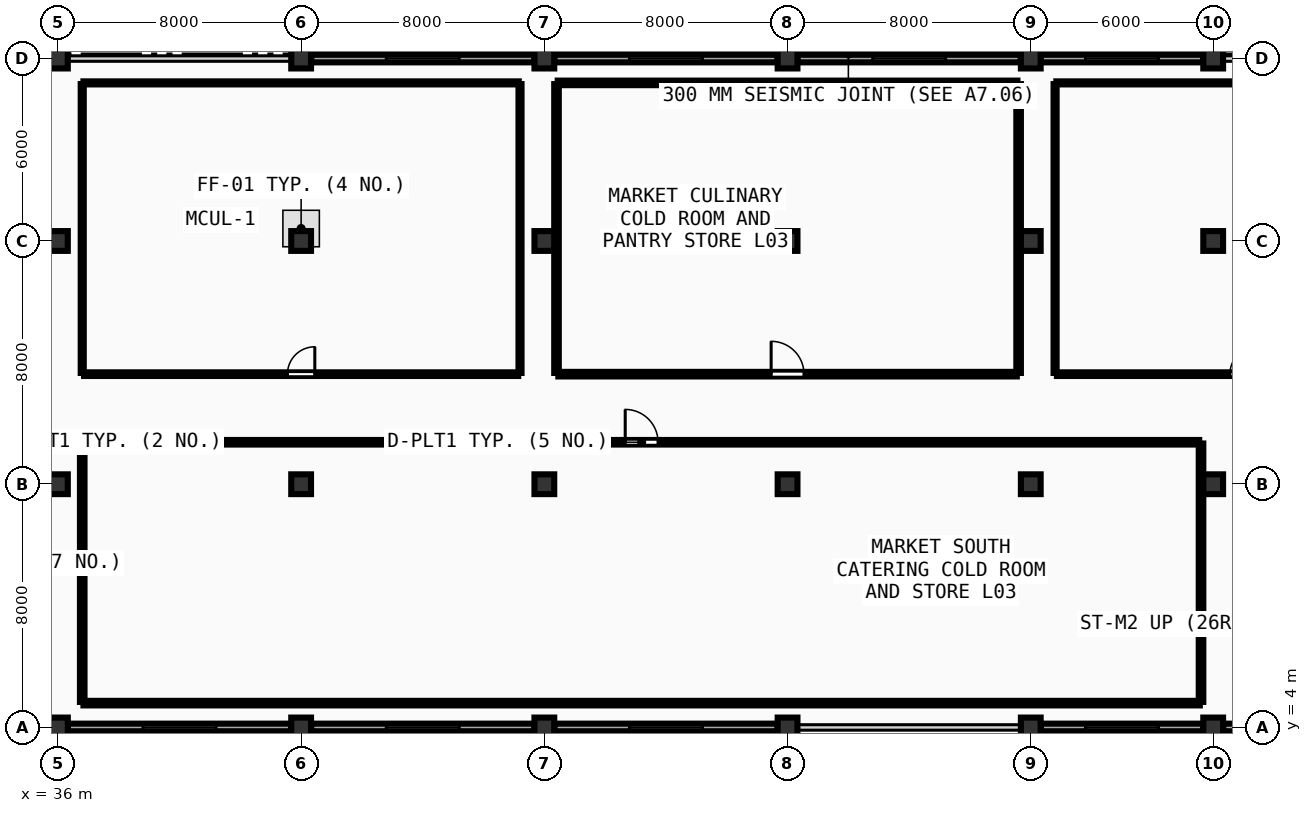
"""IFC4 building model, lengths in metres.
Left out: names, types, materials, properties, quantities, classifications, styles, units other than length and angle.
Written with IfcOpenShell. Run it as: python <this file> out.ifc"""

import sys

from ifc_helpers import new_model, si_unit, direction, frame, frame_2d, origin, origin_2d, place, context, subcontext, project, spatial, rectangle, extrude, element, fill, save


model = new_model("IFC4")
c1 = context("Model", 3, precision=1e-05, world=origin(), true_north=direction((0.0, 1.0)))
c2 = subcontext(c1, "Body", "Model", "MODEL_VIEW")
j1 = project(units=[si_unit("LENGTHUNIT", "METRE"), si_unit("PLANEANGLEUNIT", "RADIAN")], contexts=[c1])
p1 = place(None, origin())
s1 = spatial("IfcSite", under=j1, at=p1, CompositionType="ELEMENT")
p2 = place(p1, origin())
s2 = spatial("IfcBuilding", under=s1, at=p2, CompositionType="ELEMENT")
p3 = place(p2, frame((0.0, 0.0, 13.5)))
s3 = spatial("IfcBuildingStorey", under=s2, at=p3, CompositionType="ELEMENT", Elevation=13.5)
for number, where, z_axis, x_axis in (
    (1, (36.0, 4.0, 0.0), (0.0, 0.0, 1.0), (1.0, 0.0, 0.0)),
    (2, (36.0, 12.0, 0.0), (0.0, 0.0, 1.0), (1.0, 0.0, 0.0)),
    (3, (36.0, 20.0, 0.0), (0.0, 0.0, 1.0), (1.0, 0.0, 0.0)),
    (4, (36.0, 26.0, 0.0), (0.0, 0.0, 1.0), (1.0, 0.0, 0.0)),
    (5, (44.0, 4.0, 0.0), (0.0, 0.0, 1.0), (1.0, 0.0, 0.0)),
    (6, (44.0, 12.0, 0.0), (0.0, 0.0, 1.0), (1.0, 0.0, 0.0)),
    (7, (44.0, 20.0, 0.0), (0.0, 0.0, 1.0), (1.0, 0.0, 0.0)),
    (8, (44.0, 26.0, 0.0), (0.0, 0.0, 1.0), (1.0, 0.0, 0.0)),
    (9, (52.0, 4.0, 0.0), (0.0, 0.0, 1.0), (1.0, 0.0, 0.0)),
    (10, (52.0, 12.0, 0.0), (0.0, 0.0, 1.0), (1.0, 0.0, 0.0)),
    (11, (52.0, 20.0, 0.0), (0.0, 0.0, 1.0), (1.0, 0.0, 0.0)),
    (12, (52.0, 26.0, 0.0), (0.0, 0.0, 1.0), (1.0, 0.0, 0.0)),
    (13, (60.0, 4.0, 0.0), (0.0, 0.0, 1.0), (1.0, 0.0, 0.0)),
    (14, (60.0, 12.0, 0.0), (0.0, 0.0, 1.0), (1.0, 0.0, 0.0)),
    (15, (60.0, 20.0, 0.0), (0.0, 0.0, 1.0), (1.0, 0.0, 0.0)),
    (16, (60.0, 26.0, 0.0), (0.0, 0.0, 1.0), (1.0, 0.0, 0.0)),
    (17, (68.0, 4.0, 0.0), (0.0, 0.0, 1.0), (1.0, 0.0, 0.0)),
    (18, (68.0, 12.0, 0.0), (0.0, 0.0, 1.0), (1.0, 0.0, 0.0)),
    (19, (68.0, 20.0, 0.0), (0.0, 0.0, 1.0), (1.0, 0.0, 0.0)),
    (20, (68.0, 26.0, 0.0), (0.0, 0.0, 1.0), (1.0, 0.0, 0.0)),
    (21, (74.0, 4.0, 0.0), (0.0, 0.0, 1.0), (1.0, 0.0, 0.0)),
    (22, (74.0, 12.0, 0.0), (0.0, 0.0, 1.0), (1.0, 0.0, 0.0)),
    (23, (74.0, 20.0, 0.0), (0.0, 0.0, 1.0), (1.0, 0.0, 0.0)),
    (24, (74.0, 26.0, 0.0), (0.0, 0.0, 1.0), (1.0, 0.0, 0.0)),
):
    element("IfcColumn", number, at=place(p3, frame(where, z_axis=z_axis, x_axis=x_axis)), inside=s3, PredefinedType="COLUMN", context=c2, shape_type="SweptSolid", body=[
        extrude(rectangle(XDim=0.65, YDim=0.65, at=origin_2d()), origin(), (0.0, 0.0, 1.0), 4.5),
    ])
p4 = place(p3, frame((36.33, 4.0, 0.0), z_axis=(0.0, 0.0, 1.0), x_axis=(1.0, 0.0, 0.0)))
e25 = element("IfcWall", 25, at=p4, inside=s3, PredefinedType="SOLIDWALL", context=c2, shape_type="SweptSolid", body=[
    extrude(rectangle(XDim=7.34, YDim=0.25, at=frame_2d((3.67, 0.0))), origin(), (0.0, 0.0, 1.0), 3.42),
])
p5 = place(p4, frame((2.47, 0.0, 0.95)))
e26 = element("IfcOpeningElement", 26, at=p5, cuts=e25, PredefinedType="OPENING", context=c2, shape_type="SweptSolid", body=[
    extrude(rectangle(XDim=2.4, YDim=1.65, at=frame_2d((1.2, 0.825))), frame((0.0, 0.135, 0.0), z_axis=(0.0, -1.0, 0.0), x_axis=(1.0, 0.0, 0.0)), (0.0, 0.0, 1.0), 0.27),
])
p6 = place(p3, frame((44.33, 4.0, 0.0), z_axis=(0.0, 0.0, 1.0), x_axis=(1.0, 0.0, 0.0)))
e27 = element("IfcWall", 27, at=p6, inside=s3, PredefinedType="SOLIDWALL", context=c2, shape_type="SweptSolid", body=[
    extrude(rectangle(XDim=7.34, YDim=0.25, at=frame_2d((3.67, 0.0))), origin(), (0.0, 0.0, 1.0), 3.42),
])
p7 = place(p6, frame((2.47, 0.0, 0.95)))
e28 = element("IfcOpeningElement", 28, at=p7, cuts=e27, PredefinedType="OPENING", context=c2, shape_type="SweptSolid", body=[
    extrude(rectangle(XDim=2.4, YDim=1.65, at=frame_2d((1.2, 0.825))), frame((0.0, 0.135, 0.0), z_axis=(0.0, -1.0, 0.0), x_axis=(1.0, 0.0, 0.0)), (0.0, 0.0, 1.0), 0.27),
])
p8 = place(p3, frame((52.33, 4.0, 0.0), z_axis=(0.0, 0.0, 1.0), x_axis=(1.0, 0.0, 0.0)))
e29 = element("IfcWall", 29, at=p8, inside=s3, PredefinedType="SOLIDWALL", context=c2, shape_type="SweptSolid", body=[
    extrude(rectangle(XDim=7.34, YDim=0.25, at=frame_2d((3.67, 0.0))), origin(), (0.0, 0.0, 1.0), 3.42),
])
p9 = place(p8, frame((2.47, 0.0, 0.95)))
e30 = element("IfcOpeningElement", 30, at=p9, cuts=e29, PredefinedType="OPENING", context=c2, shape_type="SweptSolid", body=[
    extrude(rectangle(XDim=2.4, YDim=1.65, at=frame_2d((1.2, 0.825))), frame((0.0, 0.135, 0.0), z_axis=(0.0, -1.0, 0.0), x_axis=(1.0, 0.0, 0.0)), (0.0, 0.0, 1.0), 0.27),
])
p10 = place(p3, frame((68.33, 4.0, 0.0), z_axis=(0.0, 0.0, 1.0), x_axis=(1.0, 0.0, 0.0)))
e31 = element("IfcWall", 31, at=p10, inside=s3, PredefinedType="SOLIDWALL", context=c2, shape_type="SweptSolid", body=[
    extrude(rectangle(XDim=5.34, YDim=0.25, at=frame_2d((2.67, 0.0))), origin(), (0.0, 0.0, 1.0), 3.42),
])
p11 = place(p10, frame((1.47, 0.0, 0.95)))
e32 = element("IfcOpeningElement", 32, at=p11, cuts=e31, PredefinedType="OPENING", context=c2, shape_type="SweptSolid", body=[
    extrude(rectangle(XDim=2.4, YDim=1.65, at=frame_2d((1.2, 0.825))), frame((0.0, 0.135, 0.0), z_axis=(0.0, -1.0, 0.0), x_axis=(1.0, 0.0, 0.0)), (0.0, 0.0, 1.0), 0.27),
])
p12 = place(p3, frame((74.33, 4.0, 0.0), z_axis=(0.0, 0.0, 1.0), x_axis=(1.0, 0.0, 0.0)))
e33 = element("IfcWall", 33, at=p12, inside=s3, PredefinedType="SOLIDWALL", context=c2, shape_type="SweptSolid", body=[
    extrude(rectangle(XDim=5.34, YDim=0.25, at=frame_2d((2.67, 0.0))), origin(), (0.0, 0.0, 1.0), 3.42),
])
p13 = place(p3, frame((73.67, 26.0, 0.0), z_axis=(0.0, 0.0, 1.0), x_axis=(-1.0, 0.0, 0.0)))
e34 = element("IfcWall", 34, at=p13, inside=s3, PredefinedType="SOLIDWALL", context=c2, shape_type="SweptSolid", body=[
    extrude(rectangle(XDim=5.34, YDim=0.25, at=frame_2d((2.67, 0.0))), origin(), (0.0, 0.0, 1.0), 3.42),
])
p14 = place(p13, frame((1.47, 0.0, 0.95)))
e35 = element("IfcOpeningElement", 35, at=p14, cuts=e34, PredefinedType="OPENING", context=c2, shape_type="SweptSolid", body=[
    extrude(rectangle(XDim=2.4, YDim=1.65, at=frame_2d((1.2, 0.825))), frame((0.0, 0.135, 0.0), z_axis=(0.0, -1.0, 0.0), x_axis=(1.0, 0.0, 0.0)), (0.0, 0.0, 1.0), 0.27),
])
p15 = place(p3, frame((67.67, 26.0, 0.0), z_axis=(0.0, 0.0, 1.0), x_axis=(-1.0, 0.0, 0.0)))
e36 = element("IfcWall", 36, at=p15, inside=s3, PredefinedType="SOLIDWALL", context=c2, shape_type="SweptSolid", body=[
    extrude(rectangle(XDim=7.34, YDim=0.25, at=frame_2d((3.67, 0.0))), origin(), (0.0, 0.0, 1.0), 3.42),
])
p16 = place(p15, frame((2.47, 0.0, 0.95)))
e37 = element("IfcOpeningElement", 37, at=p16, cuts=e36, PredefinedType="OPENING", context=c2, shape_type="SweptSolid", body=[
    extrude(rectangle(XDim=2.4, YDim=1.65, at=frame_2d((1.2, 0.825))), frame((0.0, 0.135, 0.0), z_axis=(0.0, -1.0, 0.0), x_axis=(1.0, 0.0, 0.0)), (0.0, 0.0, 1.0), 0.27),
])
p17 = place(p3, frame((59.67, 26.0, 0.0), z_axis=(0.0, 0.0, 1.0), x_axis=(-1.0, 0.0, 0.0)))
e38 = element("IfcWall", 38, at=p17, inside=s3, PredefinedType="SOLIDWALL", context=c2, shape_type="SweptSolid", body=[
    extrude(rectangle(XDim=7.34, YDim=0.25, at=frame_2d((3.67, 0.0))), origin(), (0.0, 0.0, 1.0), 3.42),
])
p18 = place(p17, frame((2.47, 0.0, 0.95)))
e39 = element("IfcOpeningElement", 39, at=p18, cuts=e38, PredefinedType="OPENING", context=c2, shape_type="SweptSolid", body=[
    extrude(rectangle(XDim=2.4, YDim=1.65, at=frame_2d((1.2, 0.825))), frame((0.0, 0.135, 0.0), z_axis=(0.0, -1.0, 0.0), x_axis=(1.0, 0.0, 0.0)), (0.0, 0.0, 1.0), 0.27),
])
p19 = place(p3, frame((51.67, 26.0, 0.0), z_axis=(0.0, 0.0, 1.0), x_axis=(-1.0, 0.0, 0.0)))
e40 = element("IfcWall", 40, at=p19, inside=s3, PredefinedType="SOLIDWALL", context=c2, shape_type="SweptSolid", body=[
    extrude(rectangle(XDim=7.34, YDim=0.25, at=frame_2d((3.67, 0.0))), origin(), (0.0, 0.0, 1.0), 3.42),
])
p20 = place(p19, frame((2.47, 0.0, 0.95)))
e41 = element("IfcOpeningElement", 41, at=p20, cuts=e40, PredefinedType="OPENING", context=c2, shape_type="SweptSolid", body=[
    extrude(rectangle(XDim=2.4, YDim=1.65, at=frame_2d((1.2, 0.825))), frame((0.0, 0.135, 0.0), z_axis=(0.0, -1.0, 0.0), x_axis=(1.0, 0.0, 0.0)), (0.0, 0.0, 1.0), 0.27),
])
p21 = place(p3, frame((36.86, 15.62, 0.0), z_axis=(0.0, 0.0, 1.0), x_axis=(1.0, 0.0, 0.0)))
e42 = element("IfcWall", 42, at=p21, inside=s3, PredefinedType="PARTITIONING", context=c2, shape_type="SweptSolid", body=[
    extrude(rectangle(XDim=14.28, YDim=0.12, at=frame_2d((7.14, 0.0))), origin(), (0.0, 0.0, 1.0), 3.425),
])
p22 = place(p21, frame((6.69, 0.0, 0.0)))
e43 = element("IfcOpeningElement", 43, at=p22, cuts=e42, PredefinedType="OPENING", context=c2, shape_type="SweptSolid", body=[
    extrude(rectangle(XDim=0.9, YDim=2.08, at=frame_2d((0.45, 1.04))), frame((0.0, 0.07, 0.0), z_axis=(0.0, -1.0, 0.0), x_axis=(1.0, 0.0, 0.0)), (0.0, 0.0, 1.0), 0.14),
])
p23 = place(p3, frame((52.46, 15.62, 0.0), z_axis=(0.0, 0.0, 1.0), x_axis=(1.0, 0.0, 0.0)))
e44 = element("IfcWall", 44, at=p23, inside=s3, PredefinedType="PARTITIONING", context=c2, shape_type="SweptSolid", body=[
    extrude(rectangle(XDim=15.08, YDim=0.15, at=frame_2d((7.54, 0.0))), origin(), (0.0, 0.0, 1.0), 3.425),
])
p24 = place(p23, frame((7.0, 0.0, 0.0)))
e45 = element("IfcOpeningElement", 45, at=p24, cuts=e44, PredefinedType="OPENING", context=c2, shape_type="SweptSolid", body=[
    extrude(rectangle(XDim=1.08, YDim=2.1, at=frame_2d((0.54, 1.05))), frame((0.0, 0.085, 0.0), z_axis=(0.0, -1.0, 0.0), x_axis=(1.0, 0.0, 0.0)), (0.0, 0.0, 1.0), 0.17),
])
p25 = place(p3, frame((68.86, 15.62, 0.0), z_axis=(0.0, 0.0, 1.0), x_axis=(1.0, 0.0, 0.0)))
e46 = element("IfcWall", 46, at=p25, inside=s3, PredefinedType="PARTITIONING", context=c2, shape_type="SweptSolid", body=[
    extrude(rectangle(XDim=12.28, YDim=0.12, at=frame_2d((6.14, 0.0))), origin(), (0.0, 0.0, 1.0), 3.425),
])
p26 = place(p25, frame((5.69, 0.0, 0.0)))
e47 = element("IfcOpeningElement", 47, at=p26, cuts=e46, PredefinedType="OPENING", context=c2, shape_type="SweptSolid", body=[
    extrude(rectangle(XDim=0.9, YDim=2.08, at=frame_2d((0.45, 1.04))), frame((0.0, 0.07, 0.0), z_axis=(0.0, -1.0, 0.0), x_axis=(1.0, 0.0, 0.0)), (0.0, 0.0, 1.0), 0.14),
])
p27 = place(p3, frame((36.86, 13.38, 0.0), z_axis=(0.0, 0.0, 1.0), x_axis=(1.0, 0.0, 0.0)))
e48 = element("IfcWall", 48, at=p27, inside=s3, PredefinedType="PARTITIONING", context=c2, shape_type="SweptSolid", body=[
    extrude(rectangle(XDim=36.68, YDim=0.15, at=frame_2d((18.34, 0.0))), origin(), (0.0, 0.0, 1.0), 3.425),
])
p28 = place(p27, frame((17.8, 0.0, 0.0)))
e49 = element("IfcOpeningElement", 49, at=p28, cuts=e48, PredefinedType="OPENING", context=c2, shape_type="SweptSolid", body=[
    extrude(rectangle(XDim=1.08, YDim=2.1, at=frame_2d((0.54, 1.05))), frame((0.0, 0.085, 0.0), z_axis=(0.0, -1.0, 0.0), x_axis=(1.0, 0.0, 0.0)), (0.0, 0.0, 1.0), 0.17),
])
p29 = place(p3, frame((51.2, 15.66, 0.0), z_axis=(0.0, 0.0, 1.0), x_axis=(0.0, 1.0, 0.0)))
e50 = element("IfcWall", 50, at=p29, inside=s3, PredefinedType="PARTITIONING", context=c2, shape_type="SweptSolid", body=[
    extrude(rectangle(XDim=9.5, YDim=0.1, at=frame_2d((4.75, 0.0))), origin(), (0.0, 0.0, 1.0), 3.425),
])
p30 = place(p3, frame((51.16, 25.2, 0.0), z_axis=(0.0, 0.0, 1.0), x_axis=(-1.0, 0.0, 0.0)))
e51 = element("IfcWall", 51, at=p30, inside=s3, PredefinedType="PARTITIONING", context=c2, shape_type="SweptSolid", body=[
    extrude(rectangle(XDim=14.32, YDim=0.1, at=frame_2d((7.16, 0.0))), origin(), (0.0, 0.0, 1.0), 3.425),
])
p31 = place(p3, frame((36.8, 25.16, 0.0), z_axis=(0.0, 0.0, 1.0), x_axis=(0.0, -1.0, 0.0)))
e52 = element("IfcWall", 52, at=p31, inside=s3, PredefinedType="PARTITIONING", context=c2, shape_type="SweptSolid", body=[
    extrude(rectangle(XDim=9.5, YDim=0.1, at=frame_2d((4.75, 0.0))), origin(), (0.0, 0.0, 1.0), 3.425),
])
p32 = place(p3, frame((67.6, 15.66, 0.0), z_axis=(0.0, 0.0, 1.0), x_axis=(0.0, 1.0, 0.0)))
e53 = element("IfcWall", 53, at=p32, inside=s3, PredefinedType="PARTITIONING", context=c2, shape_type="SweptSolid", body=[
    extrude(rectangle(XDim=9.5, YDim=0.15, at=frame_2d((4.75, 0.0))), origin(), (0.0, 0.0, 1.0), 3.425),
])
p33 = place(p3, frame((67.56, 25.2, 0.0), z_axis=(0.0, 0.0, 1.0), x_axis=(-1.0, 0.0, 0.0)))
e54 = element("IfcWall", 54, at=p33, inside=s3, PredefinedType="PARTITIONING", context=c2, shape_type="SweptSolid", body=[
    extrude(rectangle(XDim=15.12, YDim=0.15, at=frame_2d((7.56, 0.0))), origin(), (0.0, 0.0, 1.0), 3.425),
])
p34 = place(p3, frame((52.4, 25.16, 0.0), z_axis=(0.0, 0.0, 1.0), x_axis=(0.0, -1.0, 0.0)))
e55 = element("IfcWall", 55, at=p34, inside=s3, PredefinedType="PARTITIONING", context=c2, shape_type="SweptSolid", body=[
    extrude(rectangle(XDim=9.5, YDim=0.15, at=frame_2d((4.75, 0.0))), origin(), (0.0, 0.0, 1.0), 3.425),
])
p35 = place(p3, frame((95.16, 25.2, 0.0), z_axis=(0.0, 0.0, 1.0), x_axis=(-1.0, 0.0, 0.0)))
e56 = element("IfcWall", 56, at=p35, inside=s3, PredefinedType="PARTITIONING", context=c2, shape_type="SweptSolid", body=[
    extrude(rectangle(XDim=26.32, YDim=0.1, at=frame_2d((13.16, 0.0))), origin(), (0.0, 0.0, 1.0), 3.425),
])
p36 = place(p3, frame((68.8, 25.16, 0.0), z_axis=(0.0, 0.0, 1.0), x_axis=(0.0, -1.0, 0.0)))
e57 = element("IfcWall", 57, at=p36, inside=s3, PredefinedType="PARTITIONING", context=c2, shape_type="SweptSolid", body=[
    extrude(rectangle(XDim=9.5, YDim=0.1, at=frame_2d((4.75, 0.0))), origin(), (0.0, 0.0, 1.0), 3.425),
])
p37 = place(p3, frame((36.84, 4.8, 0.0), z_axis=(0.0, 0.0, 1.0), x_axis=(1.0, 0.0, 0.0)))
e58 = element("IfcWall", 58, at=p37, inside=s3, PredefinedType="PARTITIONING", context=c2, shape_type="SweptSolid", body=[
    extrude(rectangle(XDim=36.72, YDim=0.15, at=frame_2d((18.36, 0.0))), origin(), (0.0, 0.0, 1.0), 3.425),
])
for number, where, z_axis, x_axis in (
    (59, (73.6, 4.84, 0.0), (0.0, 0.0, 1.0), (0.0, 1.0, 0.0)),
    (60, (36.8, 13.34, 0.0), (0.0, 0.0, 1.0), (0.0, -1.0, 0.0)),
):
    element("IfcWall", number, at=place(p3, frame(where, z_axis=z_axis, x_axis=x_axis)), inside=s3, PredefinedType="PARTITIONING", context=c2, shape_type="SweptSolid", body=[
        extrude(rectangle(XDim=8.5, YDim=0.15, at=frame_2d((4.25, 0.0))), origin(), (0.0, 0.0, 1.0), 3.425),
    ])
p38 = place(p5, origin())
e61 = element("IfcWindow", 61, at=p38, inside=s3, PartitioningType="SINGLE_PANEL", PredefinedType="WINDOW", context=c2, shape_type="SweptSolid", body=[
    extrude(rectangle(XDim=2.4, YDim=1.65, at=frame_2d((1.2, 0.825))), frame((0.0, 0.03, 0.0), z_axis=(0.0, -1.0, 0.0), x_axis=(1.0, 0.0, 0.0)), (0.0, 0.0, 1.0), 0.06),
])
fill(e26, e61)
p39 = place(p7, origin())
e62 = element("IfcWindow", 62, at=p39, inside=s3, PartitioningType="SINGLE_PANEL", PredefinedType="WINDOW", context=c2, shape_type="SweptSolid", body=[
    extrude(rectangle(XDim=2.4, YDim=1.65, at=frame_2d((1.2, 0.825))), frame((0.0, 0.03, 0.0), z_axis=(0.0, -1.0, 0.0), x_axis=(1.0, 0.0, 0.0)), (0.0, 0.0, 1.0), 0.06),
])
fill(e28, e62)
p40 = place(p9, origin())
e63 = element("IfcWindow", 63, at=p40, inside=s3, PartitioningType="SINGLE_PANEL", PredefinedType="WINDOW", context=c2, shape_type="SweptSolid", body=[
    extrude(rectangle(XDim=2.4, YDim=1.65, at=frame_2d((1.2, 0.825))), frame((0.0, 0.03, 0.0), z_axis=(0.0, -1.0, 0.0), x_axis=(1.0, 0.0, 0.0)), (0.0, 0.0, 1.0), 0.06),
])
fill(e30, e63)
p41 = place(p11, origin())
e64 = element("IfcWindow", 64, at=p41, inside=s3, PartitioningType="SINGLE_PANEL", PredefinedType="WINDOW", context=c2, shape_type="SweptSolid", body=[
    extrude(rectangle(XDim=2.4, YDim=1.65, at=frame_2d((1.2, 0.825))), frame((0.0, 0.03, 0.0), z_axis=(0.0, -1.0, 0.0), x_axis=(1.0, 0.0, 0.0)), (0.0, 0.0, 1.0), 0.06),
])
fill(e32, e64)
p42 = place(p14, origin())
e65 = element("IfcWindow", 65, at=p42, inside=s3, PartitioningType="SINGLE_PANEL", PredefinedType="WINDOW", context=c2, shape_type="SweptSolid", body=[
    extrude(rectangle(XDim=2.4, YDim=1.65, at=frame_2d((1.2, 0.825))), frame((0.0, 0.03, 0.0), z_axis=(0.0, -1.0, 0.0), x_axis=(1.0, 0.0, 0.0)), (0.0, 0.0, 1.0), 0.06),
])
fill(e35, e65)
p43 = place(p16, origin())
e66 = element("IfcWindow", 66, at=p43, inside=s3, PartitioningType="SINGLE_PANEL", PredefinedType="WINDOW", context=c2, shape_type="SweptSolid", body=[
    extrude(rectangle(XDim=2.4, YDim=1.65, at=frame_2d((1.2, 0.825))), frame((0.0, 0.03, 0.0), z_axis=(0.0, -1.0, 0.0), x_axis=(1.0, 0.0, 0.0)), (0.0, 0.0, 1.0), 0.06),
])
fill(e37, e66)
p44 = place(p18, origin())
e67 = element("IfcWindow", 67, at=p44, inside=s3, PartitioningType="SINGLE_PANEL", PredefinedType="WINDOW", context=c2, shape_type="SweptSolid", body=[
    extrude(rectangle(XDim=2.4, YDim=1.65, at=frame_2d((1.2, 0.825))), frame((0.0, 0.03, 0.0), z_axis=(0.0, -1.0, 0.0), x_axis=(1.0, 0.0, 0.0)), (0.0, 0.0, 1.0), 0.06),
])
fill(e39, e67)
p45 = place(p20, origin())
e68 = element("IfcWindow", 68, at=p45, inside=s3, PartitioningType="SINGLE_PANEL", PredefinedType="WINDOW", context=c2, shape_type="SweptSolid", body=[
    extrude(rectangle(XDim=2.4, YDim=1.65, at=frame_2d((1.2, 0.825))), frame((0.0, 0.03, 0.0), z_axis=(0.0, -1.0, 0.0), x_axis=(1.0, 0.0, 0.0)), (0.0, 0.0, 1.0), 0.06),
])
fill(e41, e68)
p46 = place(p22, origin())
e69 = element("IfcDoor", 69, at=p46, inside=s3, OperationType="SINGLE_SWING_RIGHT", PredefinedType="DOOR", context=c2, shape_type="SweptSolid", body=[
    extrude(rectangle(XDim=0.9, YDim=2.08, at=frame_2d((0.45, 1.04))), frame((0.0, 0.025, 0.0), z_axis=(0.0, -1.0, 0.0), x_axis=(1.0, 0.0, 0.0)), (0.0, 0.0, 1.0), 0.05),
])
fill(e43, e69)
p47 = place(p24, origin())
e70 = element("IfcDoor", 70, at=p47, inside=s3, OperationType="SINGLE_SWING_LEFT", PredefinedType="DOOR", context=c2, shape_type="SweptSolid", body=[
    extrude(rectangle(XDim=1.08, YDim=2.1, at=frame_2d((0.54, 1.05))), frame((0.0, 0.025, 0.0), z_axis=(0.0, -1.0, 0.0), x_axis=(1.0, 0.0, 0.0)), (0.0, 0.0, 1.0), 0.05),
])
fill(e45, e70)
p48 = place(p26, origin())
e71 = element("IfcDoor", 71, at=p48, inside=s3, OperationType="SINGLE_SWING_RIGHT", PredefinedType="DOOR", context=c2, shape_type="SweptSolid", body=[
    extrude(rectangle(XDim=0.9, YDim=2.08, at=frame_2d((0.45, 1.04))), frame((0.0, 0.025, 0.0), z_axis=(0.0, -1.0, 0.0), x_axis=(1.0, 0.0, 0.0)), (0.0, 0.0, 1.0), 0.05),
])
fill(e47, e71)
p49 = place(p28, origin())
e72 = element("IfcDoor", 72, at=p49, inside=s3, OperationType="SINGLE_SWING_LEFT", PredefinedType="DOOR", context=c2, shape_type="SweptSolid", body=[
    extrude(rectangle(XDim=1.08, YDim=2.1, at=frame_2d((0.54, 1.05))), frame((0.0, 0.025, 0.0), z_axis=(0.0, -1.0, 0.0), x_axis=(1.0, 0.0, 0.0)), (0.0, 0.0, 1.0), 0.05),
])
fill(e49, e72)
save(model, sys.argv[1])
